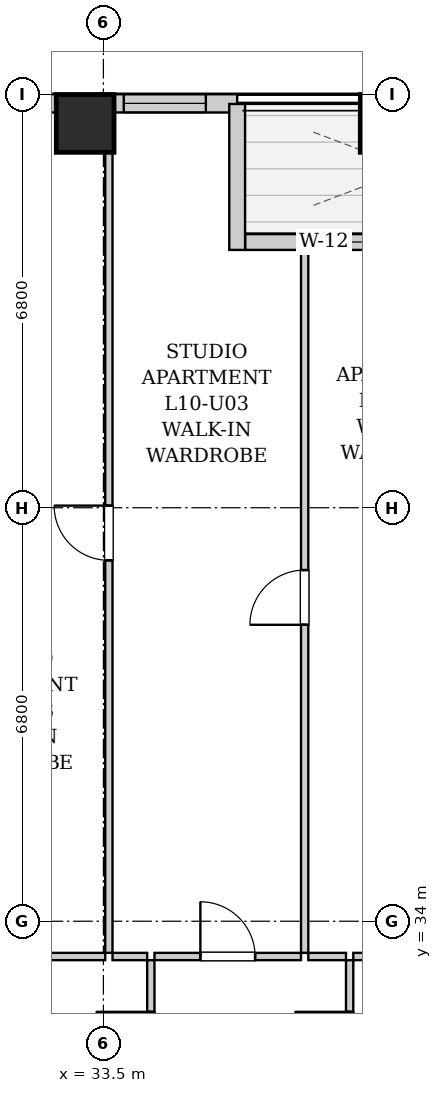
"""IFC4 building model, lengths in metres.
Left out: names, types, materials, properties, quantities, classifications, styles, units other than length and angle.
Written with IfcOpenShell. Run it as: python <this file> out.ifc"""

import sys

from ifc_helpers import new_model, si_unit, direction, frame, frame_2d, origin, origin_2d, place, context, subcontext, project, spatial, rectangle, extrude, element, fill, save


model = new_model("IFC4")
c1 = context("Model", 3, precision=1e-05, world=origin(), true_north=direction((0.0, 1.0)))
c2 = subcontext(c1, "Body", "Model", "MODEL_VIEW")
j1 = project(units=[si_unit("LENGTHUNIT", "METRE"), si_unit("PLANEANGLEUNIT", "RADIAN")], contexts=[c1])
p1 = place(None, origin())
s1 = spatial("IfcSite", under=j1, at=p1, CompositionType="ELEMENT")
p2 = place(p1, origin())
s2 = spatial("IfcBuilding", under=s1, at=p2, CompositionType="ELEMENT")
p3 = place(p2, frame((0.0, 0.0, 41.8)))
s3 = spatial("IfcBuildingStorey", under=s2, at=p3, CompositionType="ELEMENT", Elevation=41.8)
for number, where, z_axis, x_axis in (
    (1, (33.2, 47.12, 0.0), (0.0, 0.0, 1.0), (1.0, 0.0, 0.0)),
    (2, (38.2, 47.12, 0.0), (0.0, 0.0, 1.0), (1.0, 0.0, 0.0)),
):
    element("IfcColumn", number, at=place(p3, frame(where, z_axis=z_axis, x_axis=x_axis)), inside=s3, PredefinedType="COLUMN", context=c2, shape_type="SweptSolid", body=[
        extrude(rectangle(XDim=0.95, YDim=0.95, at=origin_2d()), origin(), (0.0, 0.0, 1.0), 3.2),
    ])
p4 = place(p3, frame((10.0, 47.45, 0.0), z_axis=(0.0, 0.0, 1.0), x_axis=(1.0, 0.0, 0.0)))
e3 = element("IfcWall", 3, at=p4, inside=s3, PredefinedType="SOLIDWALL", context=c2, shape_type="SweptSolid", body=[
    extrude(rectangle(XDim=25.7, YDim=0.3, at=frame_2d((12.85, 0.0))), origin(), (0.0, 0.0, 1.0), 1.975),
])
p5 = place(p4, frame((1.73, 0.0, 0.55)))
e4 = element("IfcOpeningElement", 4, at=p5, cuts=e3, PredefinedType="OPENING", context=c2, shape_type="SweptSolid", body=[
    extrude(rectangle(XDim=1.8, YDim=1.2, at=frame_2d((0.9, 0.6))), frame((0.0, 0.16, 0.0), z_axis=(0.0, -1.0, 0.0), x_axis=(1.0, 0.0, 0.0)), (0.0, 0.0, 1.0), 0.32),
])
p6 = place(p4, frame((4.961, 0.0, 0.55)))
e5 = element("IfcOpeningElement", 5, at=p6, cuts=e3, PredefinedType="OPENING", context=c2, shape_type="SweptSolid", body=[
    extrude(rectangle(XDim=1.8, YDim=1.2, at=frame_2d((0.9, 0.6))), frame((0.0, 0.16, 0.0), z_axis=(0.0, -1.0, 0.0), x_axis=(1.0, 0.0, 0.0)), (0.0, 0.0, 1.0), 0.32),
])
p7 = place(p4, frame((8.435, 0.0, 0.55)))
e6 = element("IfcOpeningElement", 6, at=p7, cuts=e3, PredefinedType="OPENING", context=c2, shape_type="SweptSolid", body=[
    extrude(rectangle(XDim=1.8, YDim=1.2, at=frame_2d((0.9, 0.6))), frame((0.0, 0.16, 0.0), z_axis=(0.0, -1.0, 0.0), x_axis=(1.0, 0.0, 0.0)), (0.0, 0.0, 1.0), 0.32),
])
p8 = place(p4, frame((11.15, 0.0, 0.55)))
e7 = element("IfcOpeningElement", 7, at=p8, cuts=e3, PredefinedType="OPENING", context=c2, shape_type="SweptSolid", body=[
    extrude(rectangle(XDim=1.35, YDim=1.2, at=frame_2d((0.675, 0.6))), frame((0.0, 0.16, 0.0), z_axis=(0.0, -1.0, 0.0), x_axis=(1.0, 0.0, 0.0)), (0.0, 0.0, 1.0), 0.32),
])
p9 = place(p4, frame((17.812, 0.0, 0.55)))
e8 = element("IfcOpeningElement", 8, at=p9, cuts=e3, PredefinedType="OPENING", context=c2, shape_type="SweptSolid", body=[
    extrude(rectangle(XDim=1.8, YDim=1.2, at=frame_2d((0.9, 0.6))), frame((0.0, 0.16, 0.0), z_axis=(0.0, -1.0, 0.0), x_axis=(1.0, 0.0, 0.0)), (0.0, 0.0, 1.0), 0.32),
])
p10 = place(p4, frame((20.765, 0.0, 0.55)))
e9 = element("IfcOpeningElement", 9, at=p10, cuts=e3, PredefinedType="OPENING", context=c2, shape_type="SweptSolid", body=[
    extrude(rectangle(XDim=1.8, YDim=1.2, at=frame_2d((0.9, 0.6))), frame((0.0, 0.16, 0.0), z_axis=(0.0, -1.0, 0.0), x_axis=(1.0, 0.0, 0.0)), (0.0, 0.0, 1.0), 0.32),
])
p11 = place(p4, frame((23.835, 0.0, 0.55)))
e10 = element("IfcOpeningElement", 10, at=p11, cuts=e3, PredefinedType="OPENING", context=c2, shape_type="SweptSolid", body=[
    extrude(rectangle(XDim=1.35, YDim=1.2, at=frame_2d((0.675, 0.6))), frame((0.0, 0.16, 0.0), z_axis=(0.0, -1.0, 0.0), x_axis=(1.0, 0.0, 0.0)), (0.0, 0.0, 1.0), 0.32),
])
p12 = place(p3, frame((35.7, 47.44, 0.0), z_axis=(0.0, 0.0, 1.0), x_axis=(0.0, -1.0, 0.0)))
e11 = element("IfcWall", 11, at=p12, inside=s3, PredefinedType="SOLIDWALL", context=c2, shape_type="SweptSolid", body=[
    extrude(rectangle(XDim=2.4, YDim=0.26, at=frame_2d((1.2, 0.0))), origin(), (0.0, 0.0, 1.0), 2.94),
])
p13 = place(p3, frame((35.834, 45.17, 0.0), z_axis=(0.0, 0.0, 1.0), x_axis=(1.0, 0.0, 0.0)))
e12 = element("IfcWall", 12, at=p13, inside=s3, PredefinedType="SOLIDWALL", context=c2, shape_type="SweptSolid", body=[
    extrude(rectangle(XDim=5.432, YDim=0.26, at=frame_2d((2.716, 0.0))), origin(), (0.0, 0.0, 1.0), 2.94),
])
p14 = place(p13, frame((2.166, 0.0, 0.0)))
e13 = element("IfcOpeningElement", 13, at=p14, cuts=e12, PredefinedType="OPENING", context=c2, shape_type="SweptSolid", body=[
    extrude(rectangle(XDim=1.1, YDim=2.0, at=frame_2d((0.55, 1.0))), frame((0.0, 0.14, 0.0), z_axis=(0.0, -1.0, 0.0), x_axis=(1.0, 0.0, 0.0)), (0.0, 0.0, 1.0), 0.28),
])
p15 = place(p13, frame((1.326, 0.0, 0.55)))
e14 = element("IfcOpeningElement", 14, at=p15, cuts=e12, PredefinedType="OPENING", context=c2, shape_type="SweptSolid", body=[
    extrude(rectangle(XDim=0.68, YDim=1.2, at=frame_2d((0.34, 0.6))), frame((0.0, 0.14, 0.0), z_axis=(0.0, -1.0, 0.0), x_axis=(1.0, 0.0, 0.0)), (0.0, 0.0, 1.0), 0.28),
])
p16 = place(p3, frame((34.28, 30.76, 0.0), z_axis=(0.0, 0.0, 1.0), x_axis=(0.0, 1.0, 0.0)))
e15 = element("IfcWall", 15, at=p16, inside=s3, PredefinedType="PARTITIONING", context=c2, shape_type="SweptSolid", body=[
    extrude(rectangle(XDim=2.6, YDim=0.12, at=frame_2d((1.3, 0.0))), origin(), (0.0, 0.0, 1.0), 2.94),
])
p17 = place(p16, frame((0.85, 0.0, 0.0)))
e16 = element("IfcOpeningElement", 16, at=p17, cuts=e15, PredefinedType="OPENING", context=c2, shape_type="SweptSolid", body=[
    extrude(rectangle(XDim=0.9, YDim=2.05, at=frame_2d((0.45, 1.025))), frame((0.0, 0.07, 0.0), z_axis=(0.0, -1.0, 0.0), x_axis=(1.0, 0.0, 0.0)), (0.0, 0.0, 1.0), 0.14),
])
p18 = place(p3, frame((30.62, 33.42, 0.0), z_axis=(0.0, 0.0, 1.0), x_axis=(1.0, 0.0, 0.0)))
e17 = element("IfcWall", 17, at=p18, inside=s3, PredefinedType="PARTITIONING", context=c2, shape_type="SweptSolid", body=[
    extrude(rectangle(XDim=2.91, YDim=0.12, at=frame_2d((1.455, 0.0))), origin(), (0.0, 0.0, 1.0), 2.94),
])
p19 = place(p18, frame((1.005, 0.0, 0.0)))
e18 = element("IfcOpeningElement", 18, at=p19, cuts=e17, PredefinedType="OPENING", context=c2, shape_type="SweptSolid", body=[
    extrude(rectangle(XDim=0.9, YDim=2.05, at=frame_2d((0.45, 1.025))), frame((0.0, 0.07, 0.0), z_axis=(0.0, -1.0, 0.0), x_axis=(1.0, 0.0, 0.0)), (0.0, 0.0, 1.0), 0.14),
])
p20 = place(p3, frame((33.65, 33.42, 0.0), z_axis=(0.0, 0.0, 1.0), x_axis=(1.0, 0.0, 0.0)))
e19 = element("IfcWall", 19, at=p20, inside=s3, PredefinedType="PARTITIONING", context=c2, shape_type="SweptSolid", body=[
    extrude(rectangle(XDim=0.57, YDim=0.12, at=frame_2d((0.285, 0.0))), origin(), (0.0, 0.0, 1.0), 2.94),
])
p21 = place(p3, frame((37.55, 30.76, 0.0), z_axis=(0.0, 0.0, 1.0), x_axis=(0.0, 1.0, 0.0)))
e20 = element("IfcWall", 20, at=p21, inside=s3, PredefinedType="PARTITIONING", context=c2, shape_type="SweptSolid", body=[
    extrude(rectangle(XDim=2.6, YDim=0.12, at=frame_2d((1.3, 0.0))), origin(), (0.0, 0.0, 1.0), 2.94),
])
p22 = place(p21, frame((0.85, 0.0, 0.0)))
e21 = element("IfcOpeningElement", 21, at=p22, cuts=e20, PredefinedType="OPENING", context=c2, shape_type="SweptSolid", body=[
    extrude(rectangle(XDim=0.9, YDim=2.05, at=frame_2d((0.45, 1.025))), frame((0.0, 0.07, 0.0), z_axis=(0.0, -1.0, 0.0), x_axis=(1.0, 0.0, 0.0)), (0.0, 0.0, 1.0), 0.14),
])
p23 = place(p3, frame((34.34, 33.42, 0.0), z_axis=(0.0, 0.0, 1.0), x_axis=(1.0, 0.0, 0.0)))
e22 = element("IfcWall", 22, at=p23, inside=s3, PredefinedType="PARTITIONING", context=c2, shape_type="SweptSolid", body=[
    extrude(rectangle(XDim=2.41, YDim=0.12, at=frame_2d((1.205, 0.0))), origin(), (0.0, 0.0, 1.0), 2.94),
])
p24 = place(p23, frame((0.755, 0.0, 0.0)))
e23 = element("IfcOpeningElement", 23, at=p24, cuts=e22, PredefinedType="OPENING", context=c2, shape_type="SweptSolid", body=[
    extrude(rectangle(XDim=0.9, YDim=2.05, at=frame_2d((0.45, 1.025))), frame((0.0, 0.07, 0.0), z_axis=(0.0, -1.0, 0.0), x_axis=(1.0, 0.0, 0.0)), (0.0, 0.0, 1.0), 0.14),
])
p25 = place(p3, frame((36.87, 33.42, 0.0), z_axis=(0.0, 0.0, 1.0), x_axis=(1.0, 0.0, 0.0)))
e24 = element("IfcWall", 24, at=p25, inside=s3, PredefinedType="PARTITIONING", context=c2, shape_type="SweptSolid", body=[
    extrude(rectangle(XDim=0.62, YDim=0.12, at=frame_2d((0.31, 0.0))), origin(), (0.0, 0.0, 1.0), 2.94),
])
p26 = place(p3, frame((37.61, 33.42, 0.0), z_axis=(0.0, 0.0, 1.0), x_axis=(1.0, 0.0, 0.0)))
e25 = element("IfcWall", 25, at=p26, inside=s3, PredefinedType="PARTITIONING", context=c2, shape_type="SweptSolid", body=[
    extrude(rectangle(XDim=2.36, YDim=0.12, at=frame_2d((1.18, 0.0))), origin(), (0.0, 0.0, 1.0), 2.94),
])
p27 = place(p26, frame((0.73, 0.0, 0.0)))
e26 = element("IfcOpeningElement", 26, at=p27, cuts=e25, PredefinedType="OPENING", context=c2, shape_type="SweptSolid", body=[
    extrude(rectangle(XDim=0.9, YDim=2.05, at=frame_2d((0.45, 1.025))), frame((0.0, 0.07, 0.0), z_axis=(0.0, -1.0, 0.0), x_axis=(1.0, 0.0, 0.0)), (0.0, 0.0, 1.0), 0.14),
])
p28 = place(p3, frame((33.59, 33.48, 0.0), z_axis=(0.0, 0.0, 1.0), x_axis=(0.0, 1.0, 0.0)))
e27 = element("IfcWall", 27, at=p28, inside=s3, PredefinedType="PARTITIONING", context=c2, shape_type="SweptSolid", body=[
    extrude(rectangle(XDim=13.84, YDim=0.12, at=frame_2d((6.92, 0.0))), origin(), (0.0, 0.0, 1.0), 2.94),
])
p29 = place(p28, frame((6.455, 0.0, 0.0)))
e28 = element("IfcOpeningElement", 28, at=p29, cuts=e27, PredefinedType="OPENING", context=c2, shape_type="SweptSolid", body=[
    extrude(rectangle(XDim=0.9, YDim=2.05, at=frame_2d((0.45, 1.025))), frame((0.0, 0.07, 0.0), z_axis=(0.0, -1.0, 0.0), x_axis=(1.0, 0.0, 0.0)), (0.0, 0.0, 1.0), 0.14),
])
p30 = place(p3, frame((36.81, 33.48, 0.0), z_axis=(0.0, 0.0, 1.0), x_axis=(0.0, 1.0, 0.0)))
e29 = element("IfcWall", 29, at=p30, inside=s3, PredefinedType="PARTITIONING", context=c2, shape_type="SweptSolid", body=[
    extrude(rectangle(XDim=11.69, YDim=0.12, at=frame_2d((5.845, 0.0))), origin(), (0.0, 0.0, 1.0), 2.94),
])
p31 = place(p30, frame((5.395, 0.0, 0.0)))
e30 = element("IfcOpeningElement", 30, at=p31, cuts=e29, PredefinedType="OPENING", context=c2, shape_type="SweptSolid", body=[
    extrude(rectangle(XDim=0.9, YDim=2.05, at=frame_2d((0.45, 1.025))), frame((0.0, 0.07, 0.0), z_axis=(0.0, -1.0, 0.0), x_axis=(1.0, 0.0, 0.0)), (0.0, 0.0, 1.0), 0.14),
])
p32 = place(p17, origin())
e31 = element("IfcDoor", 31, at=p32, inside=s3, OperationType="SINGLE_SWING_RIGHT", PredefinedType="DOOR", context=c2, shape_type="SweptSolid", body=[
    extrude(rectangle(XDim=0.9, YDim=2.05, at=frame_2d((0.45, 1.025))), frame((0.0, 0.025, 0.0), z_axis=(0.0, -1.0, 0.0), x_axis=(1.0, 0.0, 0.0)), (0.0, 0.0, 1.0), 0.05),
])
fill(e16, e31)
p33 = place(p22, origin())
e32 = element("IfcDoor", 32, at=p33, inside=s3, OperationType="SINGLE_SWING_RIGHT", PredefinedType="DOOR", context=c2, shape_type="SweptSolid", body=[
    extrude(rectangle(XDim=0.9, YDim=2.05, at=frame_2d((0.45, 1.025))), frame((0.0, 0.025, 0.0), z_axis=(0.0, -1.0, 0.0), x_axis=(1.0, 0.0, 0.0)), (0.0, 0.0, 1.0), 0.05),
])
fill(e21, e32)
p34 = place(p24, origin())
e33 = element("IfcDoor", 33, at=p34, inside=s3, OperationType="SINGLE_SWING_LEFT", PredefinedType="DOOR", context=c2, shape_type="SweptSolid", body=[
    extrude(rectangle(XDim=0.9, YDim=2.05, at=frame_2d((0.45, 1.025))), frame((0.0, 0.025, 0.0), z_axis=(0.0, -1.0, 0.0), x_axis=(1.0, 0.0, 0.0)), (0.0, 0.0, 1.0), 0.05),
])
fill(e23, e33)
p35 = place(p29, origin())
e34 = element("IfcDoor", 34, at=p35, inside=s3, OperationType="SINGLE_SWING_RIGHT", PredefinedType="DOOR", context=c2, shape_type="SweptSolid", body=[
    extrude(rectangle(XDim=0.9, YDim=2.05, at=frame_2d((0.45, 1.025))), frame((0.0, 0.025, 0.0), z_axis=(0.0, -1.0, 0.0), x_axis=(1.0, 0.0, 0.0)), (0.0, 0.0, 1.0), 0.05),
])
fill(e28, e34)
p36 = place(p31, origin())
e35 = element("IfcDoor", 35, at=p36, inside=s3, OperationType="SINGLE_SWING_LEFT", PredefinedType="DOOR", context=c2, shape_type="SweptSolid", body=[
    extrude(rectangle(XDim=0.9, YDim=2.05, at=frame_2d((0.45, 1.025))), frame((0.0, 0.025, 0.0), z_axis=(0.0, -1.0, 0.0), x_axis=(1.0, 0.0, 0.0)), (0.0, 0.0, 1.0), 0.05),
])
fill(e30, e35)
p37 = place(p11, origin())
e36 = element("IfcWindow", 36, at=p37, inside=s3, PartitioningType="SINGLE_PANEL", PredefinedType="WINDOW", context=c2, shape_type="SweptSolid", body=[
    extrude(rectangle(XDim=1.35, YDim=1.2, at=frame_2d((0.675, 0.6))), frame((0.0, 0.03, 0.0), z_axis=(0.0, -1.0, 0.0), x_axis=(1.0, 0.0, 0.0)), (0.0, 0.0, 1.0), 0.06),
])
fill(e10, e36)
p38 = place(p15, origin())
e37 = element("IfcWindow", 37, at=p38, inside=s3, PartitioningType="SINGLE_PANEL", PredefinedType="WINDOW", context=c2, shape_type="SweptSolid", body=[
    extrude(rectangle(XDim=0.68, YDim=1.2, at=frame_2d((0.34, 0.6))), frame((0.0, 0.03, 0.0), z_axis=(0.0, -1.0, 0.0), x_axis=(1.0, 0.0, 0.0)), (0.0, 0.0, 1.0), 0.06),
])
fill(e14, e37)
save(model, sys.argv[1])
